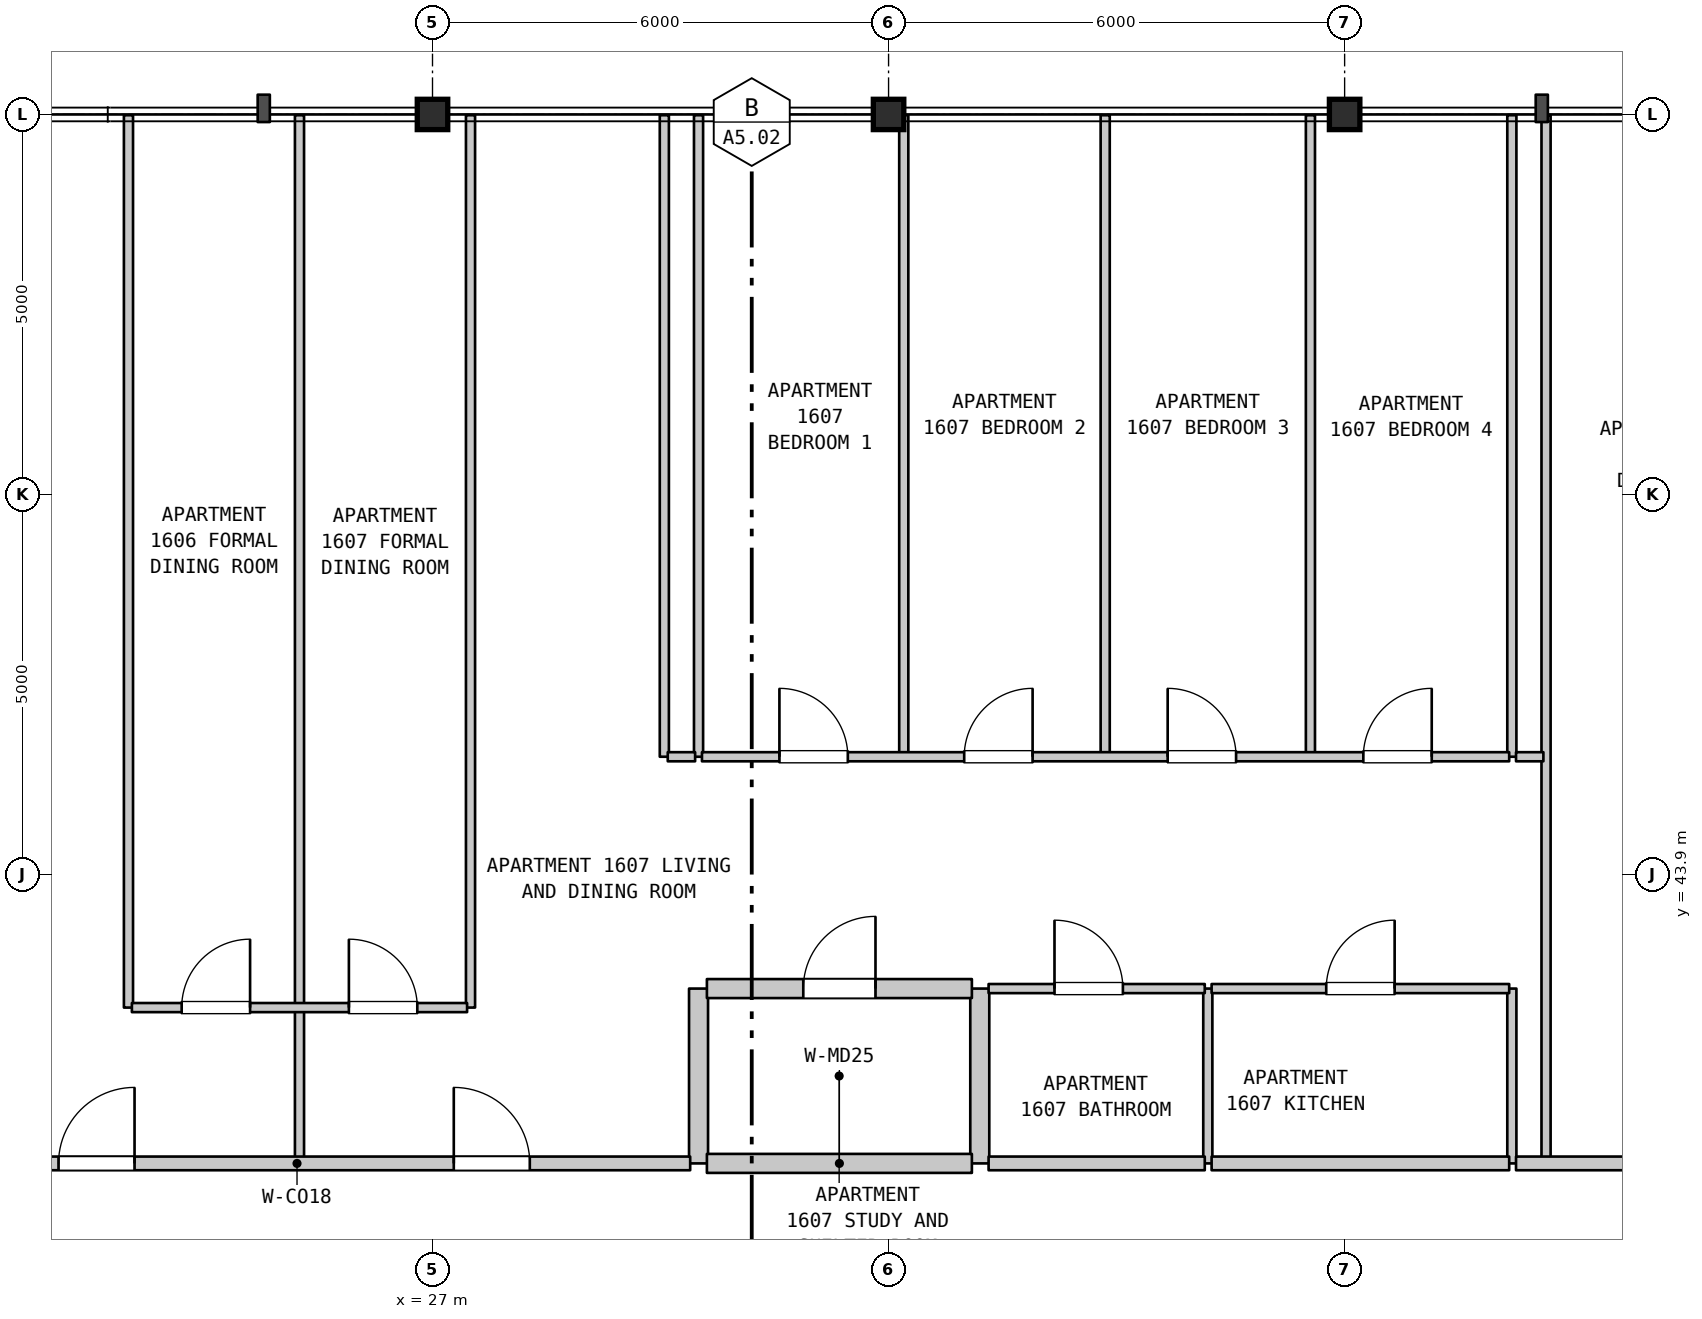
"""IFC4 building model, lengths in metres.
Left out: names, types, materials, properties, quantities, classifications, styles, units other than length and angle.
Written with IfcOpenShell. Run it as: python <this file> out.ifc"""

import sys

from ifc_helpers import new_model, si_unit, direction, frame, frame_2d, origin, origin_2d, place, context, subcontext, project, spatial, rectangle, i_section, extrude, element, fill, save


model = new_model("IFC4")
c1 = context("Model", 3, precision=1e-05, world=origin(), true_north=direction((0.0, 1.0)))
c2 = subcontext(c1, "Body", "Model", "MODEL_VIEW")
j1 = project(units=[si_unit("LENGTHUNIT", "METRE"), si_unit("PLANEANGLEUNIT", "RADIAN")], contexts=[c1])
p1 = place(None, origin())
s1 = spatial("IfcSite", under=j1, at=p1, CompositionType="ELEMENT")
p2 = place(p1, origin())
s2 = spatial("IfcBuilding", under=s1, at=p2, CompositionType="ELEMENT")
p3 = place(p2, frame((0.0, 0.0, 70.1)))
s3 = spatial("IfcBuildingStorey", under=s2, at=p3, CompositionType="ELEMENT", Elevation=70.1)
for number, where, z_axis, x_axis in (
    (1, (27.0, 53.9, 0.0), (0.0, 0.0, 1.0), (1.0, 0.0, 0.0)),
    (2, (33.0, 53.9, 0.0), (0.0, 0.0, 1.0), (1.0, 0.0, 0.0)),
    (3, (39.0, 53.9, 0.0), (0.0, 0.0, 1.0), (1.0, 0.0, 0.0)),
):
    element("IfcColumn", number, at=place(p3, frame(where, z_axis=z_axis, x_axis=x_axis)), inside=s3, PredefinedType="COLUMN", context=c2, shape_type="SweptSolid", body=[
        extrude(i_section(OverallWidth=0.401, OverallDepth=0.399, WebThickness=0.025, FlangeThickness=0.04, FilletRadius=0.015, at=origin_2d()), origin(), (0.0, 0.0, 1.0), 3.7),
    ])
p4 = place(p3, frame((23.0, 42.15, 0.0), z_axis=(0.0, 0.0, 1.0), x_axis=(0.0, 1.0, 0.0)))
e4 = element("IfcWall", 4, at=p4, inside=s3, PredefinedType="PARTITIONING", context=c2, shape_type="SweptSolid", body=[
    extrude(rectangle(XDim=11.74, YDim=0.12, at=frame_2d((5.87, 0.0))), origin(), (0.0, 0.0, 1.0), 3.385),
])
p5 = place(p3, frame((25.25, 40.1, 0.0), z_axis=(0.0, 0.0, 1.0), x_axis=(0.0, 1.0, 0.0)))
e5 = element("IfcWall", 5, at=p5, inside=s3, PredefinedType="PARTITIONING", context=c2, shape_type="SweptSolid", body=[
    extrude(rectangle(XDim=2.05, YDim=0.12, at=frame_2d((1.025, 0.0))), origin(), (0.0, 0.0, 1.0), 3.385),
])
for number, where, z_axis, x_axis in (
    (6, (25.25, 42.15, 0.0), (0.0, 0.0, 1.0), (0.0, 1.0, 0.0)),
    (7, (27.5, 42.15, 0.0), (0.0, 0.0, 1.0), (0.0, 1.0, 0.0)),
):
    element("IfcWall", number, at=place(p3, frame(where, z_axis=z_axis, x_axis=x_axis)), inside=s3, PredefinedType="PARTITIONING", context=c2, shape_type="SweptSolid", body=[
        extrude(rectangle(XDim=11.74, YDim=0.12, at=frame_2d((5.87, 0.0))), origin(), (0.0, 0.0, 1.0), 3.385),
    ])
p6 = place(p3, frame((30.05, 45.45, 0.0), z_axis=(0.0, 0.0, 1.0), x_axis=(0.0, 1.0, 0.0)))
e8 = element("IfcWall", 8, at=p6, inside=s3, PredefinedType="PARTITIONING", context=c2, shape_type="SweptSolid", body=[
    extrude(rectangle(XDim=8.44, YDim=0.12, at=frame_2d((4.22, 0.0))), origin(), (0.0, 0.0, 1.0), 3.385),
])
p7 = place(p3, frame((30.5, 40.1, 0.0), z_axis=(0.0, 0.0, 1.0), x_axis=(0.0, 1.0, 0.0)))
e9 = element("IfcWall", 9, at=p7, inside=s3, PredefinedType="STANDARD", context=c2, shape_type="SweptSolid", body=[
    extrude(rectangle(XDim=2.3, YDim=0.25, at=frame_2d((1.15, 0.0))), origin(), (0.0, 0.0, 1.0), 3.385),
])
for number, where, z_axis, x_axis in (
    (10, (30.5, 45.45, 0.0), (0.0, 0.0, 1.0), (0.0, 1.0, 0.0)),
    (11, (33.2, 45.45, 0.0), (0.0, 0.0, 1.0), (0.0, 1.0, 0.0)),
):
    element("IfcWall", number, at=place(p3, frame(where, z_axis=z_axis, x_axis=x_axis)), inside=s3, PredefinedType="PARTITIONING", context=c2, shape_type="SweptSolid", body=[
        extrude(rectangle(XDim=8.44, YDim=0.12, at=frame_2d((4.22, 0.0))), origin(), (0.0, 0.0, 1.0), 3.385),
    ])
p8 = place(p3, frame((34.2, 40.1, 0.0), z_axis=(0.0, 0.0, 1.0), x_axis=(0.0, 1.0, 0.0)))
e12 = element("IfcWall", 12, at=p8, inside=s3, PredefinedType="STANDARD", context=c2, shape_type="SweptSolid", body=[
    extrude(rectangle(XDim=2.3, YDim=0.25, at=frame_2d((1.15, 0.0))), origin(), (0.0, 0.0, 1.0), 3.385),
])
p9 = place(p3, frame((35.85, 45.45, 0.0), z_axis=(0.0, 0.0, 1.0), x_axis=(0.0, 1.0, 0.0)))
e13 = element("IfcWall", 13, at=p9, inside=s3, PredefinedType="PARTITIONING", context=c2, shape_type="SweptSolid", body=[
    extrude(rectangle(XDim=8.44, YDim=0.12, at=frame_2d((4.22, 0.0))), origin(), (0.0, 0.0, 1.0), 3.385),
])
p10 = place(p3, frame((37.2, 40.1, 0.0), z_axis=(0.0, 0.0, 1.0), x_axis=(0.0, 1.0, 0.0)))
e14 = element("IfcWall", 14, at=p10, inside=s3, PredefinedType="PARTITIONING", context=c2, shape_type="SweptSolid", body=[
    extrude(rectangle(XDim=2.3, YDim=0.12, at=frame_2d((1.15, 0.0))), origin(), (0.0, 0.0, 1.0), 3.385),
])
p11 = place(p3, frame((38.55, 45.45, 0.0), z_axis=(0.0, 0.0, 1.0), x_axis=(0.0, 1.0, 0.0)))
e15 = element("IfcWall", 15, at=p11, inside=s3, PredefinedType="PARTITIONING", context=c2, shape_type="SweptSolid", body=[
    extrude(rectangle(XDim=8.44, YDim=0.12, at=frame_2d((4.22, 0.0))), origin(), (0.0, 0.0, 1.0), 3.385),
])
p12 = place(p3, frame((41.2, 40.1, 0.0), z_axis=(0.0, 0.0, 1.0), x_axis=(0.0, 1.0, 0.0)))
e16 = element("IfcWall", 16, at=p12, inside=s3, PredefinedType="PARTITIONING", context=c2, shape_type="SweptSolid", body=[
    extrude(rectangle(XDim=2.3, YDim=0.12, at=frame_2d((1.15, 0.0))), origin(), (0.0, 0.0, 1.0), 3.385),
])
p13 = place(p3, frame((41.2, 45.45, 0.0), z_axis=(0.0, 0.0, 1.0), x_axis=(0.0, 1.0, 0.0)))
e17 = element("IfcWall", 17, at=p13, inside=s3, PredefinedType="PARTITIONING", context=c2, shape_type="SweptSolid", body=[
    extrude(rectangle(XDim=8.44, YDim=0.12, at=frame_2d((4.22, 0.0))), origin(), (0.0, 0.0, 1.0), 3.385),
])
p14 = place(p3, frame((41.65, 40.1, 0.0), z_axis=(0.0, 0.0, 1.0), x_axis=(0.0, 1.0, 0.0)))
e18 = element("IfcWall", 18, at=p14, inside=s3, PredefinedType="PARTITIONING", context=c2, shape_type="SweptSolid", body=[
    extrude(rectangle(XDim=13.79, YDim=0.12, at=frame_2d((6.895, 0.0))), origin(), (0.0, 0.0, 1.0), 3.385),
])
p15 = place(p3, frame((20.045, 40.1, 0.0), z_axis=(0.0, 0.0, 1.0), x_axis=(1.0, 0.0, 0.0)))
e19 = element("IfcWall", 19, at=p15, inside=s3, PredefinedType="STANDARD", context=c2, shape_type="SweptSolid", body=[
    extrude(rectangle(XDim=10.345, YDim=0.18, at=frame_2d((5.172, 0.0))), origin(), (0.0, 0.0, 1.0), 3.385),
])
p16 = place(p15, frame((2.035, 0.0, 0.0)))
e20 = element("IfcOpeningElement", 20, at=p16, cuts=e19, PredefinedType="OPENING", context=c2, shape_type="SweptSolid", body=[
    extrude(rectangle(XDim=1.0, YDim=2.15, at=frame_2d((0.5, 1.075))), frame((0.0, 0.1, 0.0), z_axis=(0.0, -1.0, 0.0), x_axis=(1.0, 0.0, 0.0)), (0.0, 0.0, 1.0), 0.2),
])
p17 = place(p15, frame((7.235, 0.0, 0.0)))
e21 = element("IfcOpeningElement", 21, at=p17, cuts=e19, PredefinedType="OPENING", context=c2, shape_type="SweptSolid", body=[
    extrude(rectangle(XDim=1.0, YDim=2.15, at=frame_2d((0.5, 1.075))), frame((0.0, 0.1, 0.0), z_axis=(0.0, -1.0, 0.0), x_axis=(1.0, 0.0, 0.0)), (0.0, 0.0, 1.0), 0.2),
])
p18 = place(p3, frame((30.61, 40.1, 0.0), z_axis=(0.0, 0.0, 1.0), x_axis=(1.0, 0.0, 0.0)))
e22 = element("IfcWall", 22, at=p18, inside=s3, PredefinedType="STANDARD", context=c2, shape_type="SweptSolid", body=[
    extrude(rectangle(XDim=3.486, YDim=0.25, at=frame_2d((1.743, 0.0))), origin(), (0.0, 0.0, 1.0), 3.385),
])
p19 = place(p3, frame((34.316, 40.1, 0.0), z_axis=(0.0, 0.0, 1.0), x_axis=(1.0, 0.0, 0.0)))
e23 = element("IfcWall", 23, at=p19, inside=s3, PredefinedType="STANDARD", context=c2, shape_type="SweptSolid", body=[
    extrude(rectangle(XDim=2.844, YDim=0.18, at=frame_2d((1.422, 0.0))), origin(), (0.0, 0.0, 1.0), 3.385),
])
p20 = place(p3, frame((37.25, 40.1, 0.0), z_axis=(0.0, 0.0, 1.0), x_axis=(1.0, 0.0, 0.0)))
e24 = element("IfcWall", 24, at=p20, inside=s3, PredefinedType="STANDARD", context=c2, shape_type="SweptSolid", body=[
    extrude(rectangle(XDim=3.915, YDim=0.18, at=frame_2d((1.958, 0.0))), origin(), (0.0, 0.0, 1.0), 3.385),
])
p21 = place(p3, frame((41.255, 40.1, 0.0), z_axis=(0.0, 0.0, 1.0), x_axis=(1.0, 0.0, 0.0)))
e25 = element("IfcWall", 25, at=p21, inside=s3, PredefinedType="STANDARD", context=c2, shape_type="SweptSolid", body=[
    extrude(rectangle(XDim=3.96, YDim=0.18, at=frame_2d((1.98, 0.0))), origin(), (0.0, 0.0, 1.0), 3.385),
])
p22 = place(p21, frame((1.609, 0.0, 0.0)))
e26 = element("IfcOpeningElement", 26, at=p22, cuts=e25, PredefinedType="OPENING", context=c2, shape_type="SweptSolid", body=[
    extrude(rectangle(XDim=1.0, YDim=2.15, at=frame_2d((0.5, 1.075))), frame((0.0, 0.1, 0.0), z_axis=(0.0, -1.0, 0.0), x_axis=(1.0, 0.0, 0.0)), (0.0, 0.0, 1.0), 0.2),
])
p23 = place(p3, frame((23.045, 42.15, 0.0), z_axis=(0.0, 0.0, 1.0), x_axis=(1.0, 0.0, 0.0)))
e27 = element("IfcWall", 27, at=p23, inside=s3, PredefinedType="PARTITIONING", context=c2, shape_type="SweptSolid", body=[
    extrude(rectangle(XDim=4.41, YDim=0.12, at=frame_2d((2.205, 0.0))), origin(), (0.0, 0.0, 1.0), 3.385),
])
p24 = place(p23, frame((0.655, 0.0, 0.0)))
e28 = element("IfcOpeningElement", 28, at=p24, cuts=e27, PredefinedType="OPENING", context=c2, shape_type="SweptSolid", body=[
    extrude(rectangle(XDim=0.9, YDim=2.15, at=frame_2d((0.45, 1.075))), frame((0.0, 0.07, 0.0), z_axis=(0.0, -1.0, 0.0), x_axis=(1.0, 0.0, 0.0)), (0.0, 0.0, 1.0), 0.14),
])
p25 = place(p23, frame((2.855, 0.0, 0.0)))
e29 = element("IfcOpeningElement", 29, at=p25, cuts=e27, PredefinedType="OPENING", context=c2, shape_type="SweptSolid", body=[
    extrude(rectangle(XDim=0.9, YDim=2.15, at=frame_2d((0.45, 1.075))), frame((0.0, 0.07, 0.0), z_axis=(0.0, -1.0, 0.0), x_axis=(1.0, 0.0, 0.0)), (0.0, 0.0, 1.0), 0.14),
])
p26 = place(p3, frame((30.61, 42.4, 0.0), z_axis=(0.0, 0.0, 1.0), x_axis=(1.0, 0.0, 0.0)))
e30 = element("IfcWall", 30, at=p26, inside=s3, PredefinedType="STANDARD", context=c2, shape_type="SweptSolid", body=[
    extrude(rectangle(XDim=3.486, YDim=0.25, at=frame_2d((1.743, 0.0))), origin(), (0.0, 0.0, 1.0), 3.385),
])
p27 = place(p26, frame((1.268, 0.0, 0.0)))
e31 = element("IfcOpeningElement", 31, at=p27, cuts=e30, PredefinedType="OPENING", context=c2, shape_type="SweptSolid", body=[
    extrude(rectangle(XDim=0.95, YDim=2.15, at=frame_2d((0.475, 1.075))), frame((0.0, 0.135, 0.0), z_axis=(0.0, -1.0, 0.0), x_axis=(1.0, 0.0, 0.0)), (0.0, 0.0, 1.0), 0.27),
])
p28 = place(p3, frame((34.316, 42.4, 0.0), z_axis=(0.0, 0.0, 1.0), x_axis=(1.0, 0.0, 0.0)))
e32 = element("IfcWall", 32, at=p28, inside=s3, PredefinedType="PARTITIONING", context=c2, shape_type="SweptSolid", body=[
    extrude(rectangle(XDim=2.844, YDim=0.12, at=frame_2d((1.422, 0.0))), origin(), (0.0, 0.0, 1.0), 3.385),
])
p29 = place(p28, frame((0.867, 0.0, 0.0)))
e33 = element("IfcOpeningElement", 33, at=p29, cuts=e32, PredefinedType="OPENING", context=c2, shape_type="SweptSolid", body=[
    extrude(rectangle(XDim=0.9, YDim=2.1, at=frame_2d((0.45, 1.05))), frame((0.0, 0.07, 0.0), z_axis=(0.0, -1.0, 0.0), x_axis=(1.0, 0.0, 0.0)), (0.0, 0.0, 1.0), 0.14),
])
p30 = place(p3, frame((37.25, 42.4, 0.0), z_axis=(0.0, 0.0, 1.0), x_axis=(1.0, 0.0, 0.0)))
e34 = element("IfcWall", 34, at=p30, inside=s3, PredefinedType="PARTITIONING", context=c2, shape_type="SweptSolid", body=[
    extrude(rectangle(XDim=3.915, YDim=0.12, at=frame_2d((1.958, 0.0))), origin(), (0.0, 0.0, 1.0), 3.385),
])
p31 = place(p30, frame((1.508, 0.0, 0.0)))
e35 = element("IfcOpeningElement", 35, at=p31, cuts=e34, PredefinedType="OPENING", context=c2, shape_type="SweptSolid", body=[
    extrude(rectangle(XDim=0.9, YDim=2.15, at=frame_2d((0.45, 1.075))), frame((0.0, 0.07, 0.0), z_axis=(0.0, -1.0, 0.0), x_axis=(1.0, 0.0, 0.0)), (0.0, 0.0, 1.0), 0.14),
])
p32 = place(p3, frame((30.095, 45.45, 0.0), z_axis=(0.0, 0.0, 1.0), x_axis=(1.0, 0.0, 0.0)))
e36 = element("IfcWall", 36, at=p32, inside=s3, PredefinedType="PARTITIONING", context=c2, shape_type="SweptSolid", body=[
    extrude(rectangle(XDim=0.36, YDim=0.12, at=frame_2d((0.18, 0.0))), origin(), (0.0, 0.0, 1.0), 3.385),
])
p33 = place(p3, frame((30.545, 45.45, 0.0), z_axis=(0.0, 0.0, 1.0), x_axis=(1.0, 0.0, 0.0)))
e37 = element("IfcWall", 37, at=p33, inside=s3, PredefinedType="PARTITIONING", context=c2, shape_type="SweptSolid", body=[
    extrude(rectangle(XDim=10.62, YDim=0.12, at=frame_2d((5.31, 0.0))), origin(), (0.0, 0.0, 1.0), 3.385),
])
p34 = place(p33, frame((1.019, 0.0, 0.0)))
e38 = element("IfcOpeningElement", 38, at=p34, cuts=e37, PredefinedType="OPENING", context=c2, shape_type="SweptSolid", body=[
    extrude(rectangle(XDim=0.9, YDim=2.15, at=frame_2d((0.45, 1.075))), frame((0.0, 0.07, 0.0), z_axis=(0.0, -1.0, 0.0), x_axis=(1.0, 0.0, 0.0)), (0.0, 0.0, 1.0), 0.14),
])
p35 = place(p33, frame((3.45, 0.0, 0.0)))
e39 = element("IfcOpeningElement", 39, at=p35, cuts=e37, PredefinedType="OPENING", context=c2, shape_type="SweptSolid", body=[
    extrude(rectangle(XDim=0.9, YDim=2.15, at=frame_2d((0.45, 1.075))), frame((0.0, 0.07, 0.0), z_axis=(0.0, -1.0, 0.0), x_axis=(1.0, 0.0, 0.0)), (0.0, 0.0, 1.0), 0.14),
])
p36 = place(p33, frame((6.127, 0.0, 0.0)))
e40 = element("IfcOpeningElement", 40, at=p36, cuts=e37, PredefinedType="OPENING", context=c2, shape_type="SweptSolid", body=[
    extrude(rectangle(XDim=0.9, YDim=2.15, at=frame_2d((0.45, 1.075))), frame((0.0, 0.07, 0.0), z_axis=(0.0, -1.0, 0.0), x_axis=(1.0, 0.0, 0.0)), (0.0, 0.0, 1.0), 0.14),
])
p37 = place(p33, frame((8.701, 0.0, 0.0)))
e41 = element("IfcOpeningElement", 41, at=p37, cuts=e37, PredefinedType="OPENING", context=c2, shape_type="SweptSolid", body=[
    extrude(rectangle(XDim=0.9, YDim=2.15, at=frame_2d((0.45, 1.075))), frame((0.0, 0.07, 0.0), z_axis=(0.0, -1.0, 0.0), x_axis=(1.0, 0.0, 0.0)), (0.0, 0.0, 1.0), 0.14),
])
p38 = place(p3, frame((41.255, 45.45, 0.0), z_axis=(0.0, 0.0, 1.0), x_axis=(1.0, 0.0, 0.0)))
e42 = element("IfcWall", 42, at=p38, inside=s3, PredefinedType="PARTITIONING", context=c2, shape_type="SweptSolid", body=[
    extrude(rectangle(XDim=0.36, YDim=0.12, at=frame_2d((0.18, 0.0))), origin(), (0.0, 0.0, 1.0), 3.385),
])
p39 = place(p16, origin())
e43 = element("IfcDoor", 43, at=p39, inside=s3, OperationType="SINGLE_SWING_RIGHT", PredefinedType="DOOR", context=c2, shape_type="SweptSolid", body=[
    extrude(rectangle(XDim=1.0, YDim=2.15, at=frame_2d((0.5, 1.075))), frame((0.0, 0.025, 0.0), z_axis=(0.0, -1.0, 0.0), x_axis=(1.0, 0.0, 0.0)), (0.0, 0.0, 1.0), 0.05),
])
fill(e20, e43)
p40 = place(p17, origin())
e44 = element("IfcDoor", 44, at=p40, inside=s3, OperationType="SINGLE_SWING_LEFT", PredefinedType="DOOR", context=c2, shape_type="SweptSolid", body=[
    extrude(rectangle(XDim=1.0, YDim=2.15, at=frame_2d((0.5, 1.075))), frame((0.0, 0.025, 0.0), z_axis=(0.0, -1.0, 0.0), x_axis=(1.0, 0.0, 0.0)), (0.0, 0.0, 1.0), 0.05),
])
fill(e21, e44)
p41 = place(p24, origin())
e45 = element("IfcDoor", 45, at=p41, inside=s3, OperationType="SINGLE_SWING_RIGHT", PredefinedType="DOOR", context=c2, shape_type="SweptSolid", body=[
    extrude(rectangle(XDim=0.9, YDim=2.15, at=frame_2d((0.45, 1.075))), frame((0.0, 0.025, 0.0), z_axis=(0.0, -1.0, 0.0), x_axis=(1.0, 0.0, 0.0)), (0.0, 0.0, 1.0), 0.05),
])
fill(e28, e45)
p42 = place(p25, origin())
e46 = element("IfcDoor", 46, at=p42, inside=s3, OperationType="SINGLE_SWING_LEFT", PredefinedType="DOOR", context=c2, shape_type="SweptSolid", body=[
    extrude(rectangle(XDim=0.9, YDim=2.15, at=frame_2d((0.45, 1.075))), frame((0.0, 0.025, 0.0), z_axis=(0.0, -1.0, 0.0), x_axis=(1.0, 0.0, 0.0)), (0.0, 0.0, 1.0), 0.05),
])
fill(e29, e46)
p43 = place(p27, origin())
e47 = element("IfcDoor", 47, at=p43, inside=s3, OperationType="SINGLE_SWING_RIGHT", PredefinedType="DOOR", context=c2, shape_type="SweptSolid", body=[
    extrude(rectangle(XDim=0.95, YDim=2.15, at=frame_2d((0.475, 1.075))), frame((0.0, 0.025, 0.0), z_axis=(0.0, -1.0, 0.0), x_axis=(1.0, 0.0, 0.0)), (0.0, 0.0, 1.0), 0.05),
])
fill(e31, e47)
p44 = place(p29, origin())
e48 = element("IfcDoor", 48, at=p44, inside=s3, OperationType="SINGLE_SWING_LEFT", PredefinedType="DOOR", context=c2, shape_type="SweptSolid", body=[
    extrude(rectangle(XDim=0.9, YDim=2.1, at=frame_2d((0.45, 1.05))), frame((0.0, 0.025, 0.0), z_axis=(0.0, -1.0, 0.0), x_axis=(1.0, 0.0, 0.0)), (0.0, 0.0, 1.0), 0.05),
])
fill(e33, e48)
p45 = place(p31, origin())
e49 = element("IfcDoor", 49, at=p45, inside=s3, OperationType="SINGLE_SWING_RIGHT", PredefinedType="DOOR", context=c2, shape_type="SweptSolid", body=[
    extrude(rectangle(XDim=0.9, YDim=2.15, at=frame_2d((0.45, 1.075))), frame((0.0, 0.025, 0.0), z_axis=(0.0, -1.0, 0.0), x_axis=(1.0, 0.0, 0.0)), (0.0, 0.0, 1.0), 0.05),
])
fill(e35, e49)
p46 = place(p34, origin())
e50 = element("IfcDoor", 50, at=p46, inside=s3, OperationType="SINGLE_SWING_LEFT", PredefinedType="DOOR", context=c2, shape_type="SweptSolid", body=[
    extrude(rectangle(XDim=0.9, YDim=2.15, at=frame_2d((0.45, 1.075))), frame((0.0, 0.025, 0.0), z_axis=(0.0, -1.0, 0.0), x_axis=(1.0, 0.0, 0.0)), (0.0, 0.0, 1.0), 0.05),
])
fill(e38, e50)
p47 = place(p35, origin())
e51 = element("IfcDoor", 51, at=p47, inside=s3, OperationType="SINGLE_SWING_RIGHT", PredefinedType="DOOR", context=c2, shape_type="SweptSolid", body=[
    extrude(rectangle(XDim=0.9, YDim=2.15, at=frame_2d((0.45, 1.075))), frame((0.0, 0.025, 0.0), z_axis=(0.0, -1.0, 0.0), x_axis=(1.0, 0.0, 0.0)), (0.0, 0.0, 1.0), 0.05),
])
fill(e39, e51)
p48 = place(p36, origin())
e52 = element("IfcDoor", 52, at=p48, inside=s3, OperationType="SINGLE_SWING_LEFT", PredefinedType="DOOR", context=c2, shape_type="SweptSolid", body=[
    extrude(rectangle(XDim=0.9, YDim=2.15, at=frame_2d((0.45, 1.075))), frame((0.0, 0.025, 0.0), z_axis=(0.0, -1.0, 0.0), x_axis=(1.0, 0.0, 0.0)), (0.0, 0.0, 1.0), 0.05),
])
fill(e40, e52)
p49 = place(p37, origin())
e53 = element("IfcDoor", 53, at=p49, inside=s3, OperationType="SINGLE_SWING_RIGHT", PredefinedType="DOOR", context=c2, shape_type="SweptSolid", body=[
    extrude(rectangle(XDim=0.9, YDim=2.15, at=frame_2d((0.45, 1.075))), frame((0.0, 0.025, 0.0), z_axis=(0.0, -1.0, 0.0), x_axis=(1.0, 0.0, 0.0)), (0.0, 0.0, 1.0), 0.05),
])
fill(e41, e53)
save(model, sys.argv[1])
